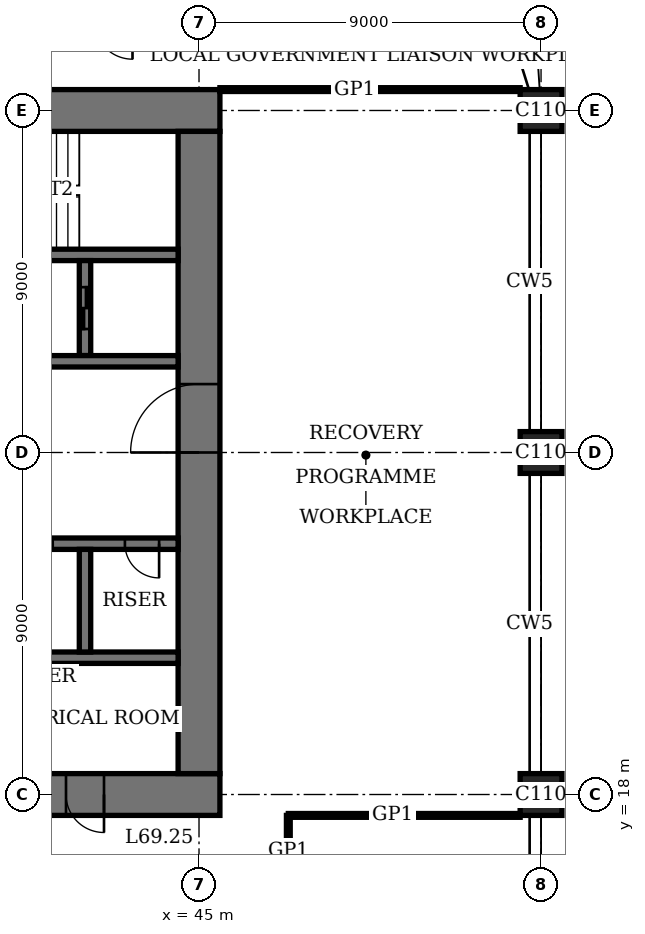
"""IFC4 building model, lengths in metres.
Left out: names, types, materials, properties, quantities, classifications, styles, units other than length and angle.
Written with IfcOpenShell. Run it as: python <this file> out.ifc"""

import sys

from ifc_helpers import new_model, si_unit, direction, frame, frame_2d, origin, origin_2d, place, context, subcontext, project, spatial, rectangle, extrude, element, fill, save


model = new_model("IFC4")
c1 = context("Model", 3, precision=1e-05, world=origin(), true_north=direction((0.0, 1.0)))
c2 = subcontext(c1, "Body", "Model", "MODEL_VIEW")
j1 = project(units=[si_unit("LENGTHUNIT", "METRE"), si_unit("PLANEANGLEUNIT", "RADIAN")], contexts=[c1])
p1 = place(None, origin())
s1 = spatial("IfcSite", under=j1, at=p1, CompositionType="ELEMENT")
p2 = place(p1, origin())
s2 = spatial("IfcBuilding", under=s1, at=p2, CompositionType="ELEMENT")
p3 = place(p2, frame((0.0, 0.0, 283.4)))
s3 = spatial("IfcBuildingStorey", under=s2, at=p3, CompositionType="ELEMENT", Elevation=283.4)
for number, where, z_axis, x_axis in (
    (1, (54.0, 18.0, 0.0), (0.0, 0.0, 1.0), (1.0, 0.0, 0.0)),
    (2, (54.0, 27.0, 0.0), (0.0, 0.0, 1.0), (1.0, 0.0, 0.0)),
    (3, (54.0, 36.0, 0.0), (0.0, 0.0, 1.0), (1.0, 0.0, 0.0)),
):
    element("IfcColumn", number, at=place(p3, frame(where, z_axis=z_axis, x_axis=x_axis)), inside=s3, PredefinedType="COLUMN", context=c2, shape_type="SweptSolid", body=[
        extrude(rectangle(XDim=1.1, YDim=1.1, at=origin_2d()), origin(), (0.0, 0.0, 1.0), 4.0),
    ])
p4 = place(p3, frame((17.45, 18.0, 0.0), z_axis=(0.0, 0.0, 1.0), x_axis=(1.0, 0.0, 0.0)))
e4 = element("IfcWall", 4, at=p4, inside=s3, PredefinedType="SHEAR", context=c2, shape_type="SweptSolid", body=[
    extrude(rectangle(XDim=28.1, YDim=1.1, at=frame_2d((14.05, 0.0))), origin(), (0.0, 0.0, 1.0), 4.0),
])
p5 = place(p4, frame((11.55, 0.0, 0.0)))
e5 = element("IfcOpeningElement", 5, at=p5, cuts=e4, PredefinedType="OPENING", context=c2, shape_type="SweptSolid", body=[
    extrude(rectangle(XDim=1.0, YDim=2.4, at=frame_2d((0.5, 1.2))), frame((0.0, 0.56, 0.0), z_axis=(0.0, -1.0, 0.0), x_axis=(1.0, 0.0, 0.0)), (0.0, 0.0, 1.0), 1.12),
])
p6 = place(p4, frame((16.55, 0.0, 0.0)))
e6 = element("IfcOpeningElement", 6, at=p6, cuts=e4, PredefinedType="OPENING", context=c2, shape_type="SweptSolid", body=[
    extrude(rectangle(XDim=1.0, YDim=2.4, at=frame_2d((0.5, 1.2))), frame((0.0, 0.56, 0.0), z_axis=(0.0, -1.0, 0.0), x_axis=(1.0, 0.0, 0.0)), (0.0, 0.0, 1.0), 1.12),
])
p7 = place(p4, frame((20.0, 0.0, 0.0)))
e7 = element("IfcOpeningElement", 7, at=p7, cuts=e4, PredefinedType="OPENING", context=c2, shape_type="SweptSolid", body=[
    extrude(rectangle(XDim=1.1, YDim=2.4, at=frame_2d((0.55, 1.2))), frame((0.0, 0.56, 0.0), z_axis=(0.0, -1.0, 0.0), x_axis=(1.0, 0.0, 0.0)), (0.0, 0.0, 1.0), 1.12),
])
p8 = place(p4, frame((24.05, 0.0, 0.0)))
e8 = element("IfcOpeningElement", 8, at=p8, cuts=e4, PredefinedType="OPENING", context=c2, shape_type="SweptSolid", body=[
    extrude(rectangle(XDim=1.0, YDim=2.4, at=frame_2d((0.5, 1.2))), frame((0.0, 0.56, 0.0), z_axis=(0.0, -1.0, 0.0), x_axis=(1.0, 0.0, 0.0)), (0.0, 0.0, 1.0), 1.12),
])
p9 = place(p3, frame((45.55, 36.0, 0.0), z_axis=(0.0, 0.0, 1.0), x_axis=(-1.0, 0.0, 0.0)))
e9 = element("IfcWall", 9, at=p9, inside=s3, PredefinedType="SHEAR", context=c2, shape_type="SweptSolid", body=[
    extrude(rectangle(XDim=28.1, YDim=1.1, at=frame_2d((14.05, 0.0))), origin(), (0.0, 0.0, 1.0), 4.0),
])
p10 = place(p9, frame((11.55, 0.0, 0.0)))
e10 = element("IfcOpeningElement", 10, at=p10, cuts=e9, PredefinedType="OPENING", context=c2, shape_type="SweptSolid", body=[
    extrude(rectangle(XDim=1.0, YDim=2.4, at=frame_2d((0.5, 1.2))), frame((0.0, 0.56, 0.0), z_axis=(0.0, -1.0, 0.0), x_axis=(1.0, 0.0, 0.0)), (0.0, 0.0, 1.0), 1.12),
])
p11 = place(p9, frame((16.55, 0.0, 0.0)))
e11 = element("IfcOpeningElement", 11, at=p11, cuts=e9, PredefinedType="OPENING", context=c2, shape_type="SweptSolid", body=[
    extrude(rectangle(XDim=1.0, YDim=2.4, at=frame_2d((0.5, 1.2))), frame((0.0, 0.56, 0.0), z_axis=(0.0, -1.0, 0.0), x_axis=(1.0, 0.0, 0.0)), (0.0, 0.0, 1.0), 1.12),
])
p12 = place(p9, frame((20.0, 0.0, 0.0)))
e12 = element("IfcOpeningElement", 12, at=p12, cuts=e9, PredefinedType="OPENING", context=c2, shape_type="SweptSolid", body=[
    extrude(rectangle(XDim=1.1, YDim=2.4, at=frame_2d((0.55, 1.2))), frame((0.0, 0.56, 0.0), z_axis=(0.0, -1.0, 0.0), x_axis=(1.0, 0.0, 0.0)), (0.0, 0.0, 1.0), 1.12),
])
p13 = place(p9, frame((24.05, 0.0, 0.0)))
e13 = element("IfcOpeningElement", 13, at=p13, cuts=e9, PredefinedType="OPENING", context=c2, shape_type="SweptSolid", body=[
    extrude(rectangle(XDim=1.0, YDim=2.4, at=frame_2d((0.5, 1.2))), frame((0.0, 0.56, 0.0), z_axis=(0.0, -1.0, 0.0), x_axis=(1.0, 0.0, 0.0)), (0.0, 0.0, 1.0), 1.12),
])
p14 = place(p3, frame((45.0, 18.55, 0.0), z_axis=(0.0, 0.0, 1.0), x_axis=(0.0, 1.0, 0.0)))
e14 = element("IfcWall", 14, at=p14, inside=s3, PredefinedType="SHEAR", context=c2, shape_type="SweptSolid", body=[
    extrude(rectangle(XDim=16.9, YDim=1.1, at=frame_2d((8.45, 0.0))), origin(), (0.0, 0.0, 1.0), 4.0),
])
p15 = place(p14, frame((8.45, 0.0, 0.0)))
e15 = element("IfcOpeningElement", 15, at=p15, cuts=e14, PredefinedType="OPENING", context=c2, shape_type="SweptSolid", body=[
    extrude(rectangle(XDim=1.8, YDim=2.4, at=frame_2d((0.9, 1.2))), frame((0.0, 0.56, 0.0), z_axis=(0.0, -1.0, 0.0), x_axis=(1.0, 0.0, 0.0)), (0.0, 0.0, 1.0), 1.12),
])
p16 = place(p3, frame((36.15, 32.2, 0.0), z_axis=(0.0, 0.0, 1.0), x_axis=(1.0, 0.0, 0.0)))
e16 = element("IfcWall", 16, at=p16, inside=s3, PredefinedType="SHEAR", context=c2, shape_type="SweptSolid", body=[
    extrude(rectangle(XDim=8.3, YDim=0.3, at=frame_2d((4.15, 0.0))), origin(), (0.0, 0.0, 1.0), 4.0),
])
p17 = place(p16, frame((0.45, 0.0, 0.0)))
e17 = element("IfcOpeningElement", 17, at=p17, cuts=e16, PredefinedType="OPENING", context=c2, shape_type="SweptSolid", body=[
    extrude(rectangle(XDim=1.0, YDim=2.4, at=frame_2d((0.5, 1.2))), frame((0.0, 0.16, 0.0), z_axis=(0.0, -1.0, 0.0), x_axis=(1.0, 0.0, 0.0)), (0.0, 0.0, 1.0), 0.32),
])
p18 = place(p3, frame((42.0, 29.55, 0.0), z_axis=(0.0, 0.0, 1.0), x_axis=(0.0, 1.0, 0.0)))
e18 = element("IfcWall", 18, at=p18, inside=s3, PredefinedType="SHEAR", context=c2, shape_type="SweptSolid", body=[
    extrude(rectangle(XDim=2.5, YDim=0.3, at=frame_2d((1.25, 0.0))), origin(), (0.0, 0.0, 1.0), 4.0),
])
p19 = place(p18, frame((0.7, 0.0, 0.0)))
e19 = element("IfcOpeningElement", 19, at=p19, cuts=e18, PredefinedType="OPENING", context=c2, shape_type="SweptSolid", body=[
    extrude(rectangle(XDim=1.1, YDim=2.4, at=frame_2d((0.55, 1.2))), frame((0.0, 0.16, 0.0), z_axis=(0.0, -1.0, 0.0), x_axis=(1.0, 0.0, 0.0)), (0.0, 0.0, 1.0), 0.32),
])
p20 = place(p3, frame((18.55, 24.6, 0.0), z_axis=(0.0, 0.0, 1.0), x_axis=(1.0, 0.0, 0.0)))
e20 = element("IfcWall", 20, at=p20, inside=s3, PredefinedType="SHEAR", context=c2, shape_type="SweptSolid", body=[
    extrude(rectangle(XDim=25.9, YDim=0.3, at=frame_2d((12.95, 0.0))), origin(), (0.0, 0.0, 1.0), 4.0),
])
p21 = place(p20, frame((4.95, 0.0, 0.0)))
e21 = element("IfcOpeningElement", 21, at=p21, cuts=e20, PredefinedType="OPENING", context=c2, shape_type="SweptSolid", body=[
    extrude(rectangle(XDim=1.0, YDim=2.4, at=frame_2d((0.5, 1.2))), frame((0.0, 0.16, 0.0), z_axis=(0.0, -1.0, 0.0), x_axis=(1.0, 0.0, 0.0)), (0.0, 0.0, 1.0), 0.32),
])
p22 = place(p20, frame((24.5, 0.0, 0.0)))
e22 = element("IfcOpeningElement", 22, at=p22, cuts=e20, PredefinedType="OPENING", context=c2, shape_type="SweptSolid", body=[
    extrude(rectangle(XDim=0.9, YDim=2.1, at=frame_2d((0.45, 1.05))), frame((0.0, 0.16, 0.0), z_axis=(0.0, -1.0, 0.0), x_axis=(1.0, 0.0, 0.0)), (0.0, 0.0, 1.0), 0.32),
])
p23 = place(p20, frame((9.4, 0.0, 0.0)))
e23 = element("IfcOpeningElement", 23, at=p23, cuts=e20, PredefinedType="OPENING", context=c2, shape_type="SweptSolid", body=[
    extrude(rectangle(XDim=1.1, YDim=2.4, at=frame_2d((0.55, 1.2))), frame((0.0, 0.16, 0.0), z_axis=(0.0, -1.0, 0.0), x_axis=(1.0, 0.0, 0.0)), (0.0, 0.0, 1.0), 0.32),
])
p24 = place(p20, frame((12.4, 0.0, 0.0)))
e24 = element("IfcOpeningElement", 24, at=p24, cuts=e20, PredefinedType="OPENING", context=c2, shape_type="SweptSolid", body=[
    extrude(rectangle(XDim=1.1, YDim=2.4, at=frame_2d((0.55, 1.2))), frame((0.0, 0.16, 0.0), z_axis=(0.0, -1.0, 0.0), x_axis=(1.0, 0.0, 0.0)), (0.0, 0.0, 1.0), 0.32),
])
p25 = place(p20, frame((15.4, 0.0, 0.0)))
e25 = element("IfcOpeningElement", 25, at=p25, cuts=e20, PredefinedType="OPENING", context=c2, shape_type="SweptSolid", body=[
    extrude(rectangle(XDim=1.1, YDim=2.4, at=frame_2d((0.55, 1.2))), frame((0.0, 0.16, 0.0), z_axis=(0.0, -1.0, 0.0), x_axis=(1.0, 0.0, 0.0)), (0.0, 0.0, 1.0), 0.32),
])
p26 = place(p20, frame((18.4, 0.0, 0.0)))
e26 = element("IfcOpeningElement", 26, at=p26, cuts=e20, PredefinedType="OPENING", context=c2, shape_type="SweptSolid", body=[
    extrude(rectangle(XDim=1.1, YDim=2.4, at=frame_2d((0.55, 1.2))), frame((0.0, 0.16, 0.0), z_axis=(0.0, -1.0, 0.0), x_axis=(1.0, 0.0, 0.0)), (0.0, 0.0, 1.0), 0.32),
])
p27 = place(p20, frame((21.3, 0.0, 0.0)))
e27 = element("IfcOpeningElement", 27, at=p27, cuts=e20, PredefinedType="OPENING", context=c2, shape_type="SweptSolid", body=[
    extrude(rectangle(XDim=1.3, YDim=2.4, at=frame_2d((0.65, 1.2))), frame((0.0, 0.16, 0.0), z_axis=(0.0, -1.0, 0.0), x_axis=(1.0, 0.0, 0.0)), (0.0, 0.0, 1.0), 0.32),
])
p28 = place(p3, frame((18.55, 29.4, 0.0), z_axis=(0.0, 0.0, 1.0), x_axis=(1.0, 0.0, 0.0)))
e28 = element("IfcWall", 28, at=p28, inside=s3, PredefinedType="SHEAR", context=c2, shape_type="SweptSolid", body=[
    extrude(rectangle(XDim=25.9, YDim=0.3, at=frame_2d((12.95, 0.0))), origin(), (0.0, 0.0, 1.0), 4.0),
])
p29 = place(p28, frame((19.95, 0.0, 0.0)))
e29 = element("IfcOpeningElement", 29, at=p29, cuts=e28, PredefinedType="OPENING", context=c2, shape_type="SweptSolid", body=[
    extrude(rectangle(XDim=1.0, YDim=2.4, at=frame_2d((0.5, 1.2))), frame((0.0, 0.16, 0.0), z_axis=(0.0, -1.0, 0.0), x_axis=(1.0, 0.0, 0.0)), (0.0, 0.0, 1.0), 0.32),
])
p30 = place(p28, frame((0.5, 0.0, 0.0)))
e30 = element("IfcOpeningElement", 30, at=p30, cuts=e28, PredefinedType="OPENING", context=c2, shape_type="SweptSolid", body=[
    extrude(rectangle(XDim=0.9, YDim=2.1, at=frame_2d((0.45, 1.05))), frame((0.0, 0.16, 0.0), z_axis=(0.0, -1.0, 0.0), x_axis=(1.0, 0.0, 0.0)), (0.0, 0.0, 1.0), 0.32),
])
p31 = place(p28, frame((15.45, 0.0, 0.0)))
e31 = element("IfcOpeningElement", 31, at=p31, cuts=e28, PredefinedType="OPENING", context=c2, shape_type="SweptSolid", body=[
    extrude(rectangle(XDim=1.0, YDim=2.4, at=frame_2d((0.5, 1.2))), frame((0.0, 0.16, 0.0), z_axis=(0.0, -1.0, 0.0), x_axis=(1.0, 0.0, 0.0)), (0.0, 0.0, 1.0), 0.32),
])
p32 = place(p28, frame((12.45, 0.0, 0.0)))
e32 = element("IfcOpeningElement", 32, at=p32, cuts=e28, PredefinedType="OPENING", context=c2, shape_type="SweptSolid", body=[
    extrude(rectangle(XDim=1.0, YDim=2.4, at=frame_2d((0.5, 1.2))), frame((0.0, 0.16, 0.0), z_axis=(0.0, -1.0, 0.0), x_axis=(1.0, 0.0, 0.0)), (0.0, 0.0, 1.0), 0.32),
])
p33 = place(p28, frame((9.45, 0.0, 0.0)))
e33 = element("IfcOpeningElement", 33, at=p33, cuts=e28, PredefinedType="OPENING", context=c2, shape_type="SweptSolid", body=[
    extrude(rectangle(XDim=1.0, YDim=2.4, at=frame_2d((0.5, 1.2))), frame((0.0, 0.16, 0.0), z_axis=(0.0, -1.0, 0.0), x_axis=(1.0, 0.0, 0.0)), (0.0, 0.0, 1.0), 0.32),
])
p34 = place(p28, frame((6.45, 0.0, 0.0)))
e34 = element("IfcOpeningElement", 34, at=p34, cuts=e28, PredefinedType="OPENING", context=c2, shape_type="SweptSolid", body=[
    extrude(rectangle(XDim=1.0, YDim=2.4, at=frame_2d((0.5, 1.2))), frame((0.0, 0.16, 0.0), z_axis=(0.0, -1.0, 0.0), x_axis=(1.0, 0.0, 0.0)), (0.0, 0.0, 1.0), 0.32),
])
p35 = place(p28, frame((3.3, 0.0, 0.0)))
e35 = element("IfcOpeningElement", 35, at=p35, cuts=e28, PredefinedType="OPENING", context=c2, shape_type="SweptSolid", body=[
    extrude(rectangle(XDim=1.3, YDim=2.4, at=frame_2d((0.65, 1.2))), frame((0.0, 0.16, 0.0), z_axis=(0.0, -1.0, 0.0), x_axis=(1.0, 0.0, 0.0)), (0.0, 0.0, 1.0), 0.32),
])
p36 = place(p3, frame((27.15, 21.6, 0.0), z_axis=(0.0, 0.0, 1.0), x_axis=(1.0, 0.0, 0.0)))
e36 = element("IfcWall", 36, at=p36, inside=s3, PredefinedType="SHEAR", context=c2, shape_type="SweptSolid", body=[
    extrude(rectangle(XDim=17.3, YDim=0.3, at=frame_2d((8.65, 0.0))), origin(), (0.0, 0.0, 1.0), 4.0),
])
p37 = place(p3, frame((42.0, 21.75, 0.0), z_axis=(0.0, 0.0, 1.0), x_axis=(0.0, 1.0, 0.0)))
e37 = element("IfcWall", 37, at=p37, inside=s3, PredefinedType="SHEAR", context=c2, shape_type="SweptSolid", body=[
    extrude(rectangle(XDim=2.7, YDim=0.3, at=frame_2d((1.35, 0.0))), origin(), (0.0, 0.0, 1.0), 4.0),
])
p38 = place(p3, frame((47.35, 17.45, 0.0), z_axis=(0.0, 0.0, 1.0), x_axis=(1.0, 0.0, 0.0)))
e38 = element("IfcWall", 38, at=p38, inside=s3, PredefinedType="PARTITIONING", context=c2, shape_type="SweptSolid", body=[
    extrude(rectangle(XDim=6.1, YDim=0.1, at=frame_2d((3.05, 0.0))), origin(), (0.0, 0.0, 1.0), 3.75),
])
p39 = place(p3, frame((45.55, 36.55, 0.0), z_axis=(0.0, 0.0, 1.0), x_axis=(1.0, 0.0, 0.0)))
e39 = element("IfcWall", 39, at=p39, inside=s3, PredefinedType="PARTITIONING", context=c2, shape_type="SweptSolid", body=[
    extrude(rectangle(XDim=7.9, YDim=0.1, at=frame_2d((3.95, 0.0))), origin(), (0.0, 0.0, 1.0), 3.75),
])
p40 = place(p3, frame((47.35, 15.6, 0.0), z_axis=(0.0, 0.0, 1.0), x_axis=(0.0, 1.0, 0.0)))
e40 = element("IfcWall", 40, at=p40, inside=s3, PredefinedType="PARTITIONING", context=c2, shape_type="SweptSolid", body=[
    extrude(rectangle(XDim=1.85, YDim=0.1, at=frame_2d((0.925, 0.0))), origin(), (0.0, 0.0, 1.0), 3.75),
])
p41 = place(p15, origin())
e41 = element("IfcDoor", 41, at=p41, inside=s3, OperationType="DOUBLE_DOOR_DOUBLE_SWING", PredefinedType="DOOR", context=c2, shape_type="SweptSolid", body=[
    extrude(rectangle(XDim=1.8, YDim=2.4, at=frame_2d((0.9, 1.2))), frame((0.0, 0.03, 0.0), z_axis=(0.0, -1.0, 0.0), x_axis=(1.0, 0.0, 0.0)), (0.0, 0.0, 1.0), 0.06),
    extrude(rectangle(XDim=0.04, YDim=2.4, at=frame_2d((0.02, 1.2))), frame((0.0, 0.55, 0.0), z_axis=(0.0, -1.0, 0.0), x_axis=(1.0, 0.0, 0.0)), (0.0, 0.0, 1.0), 1.1),
    extrude(rectangle(XDim=0.04, YDim=2.4, at=frame_2d((1.78, 1.2))), frame((0.0, 0.55, 0.0), z_axis=(0.0, -1.0, 0.0), x_axis=(1.0, 0.0, 0.0)), (0.0, 0.0, 1.0), 1.1),
    extrude(rectangle(XDim=1.8, YDim=0.04, at=frame_2d((0.9, 2.38))), frame((0.0, 0.55, 0.0), z_axis=(0.0, -1.0, 0.0), x_axis=(1.0, 0.0, 0.0)), (0.0, 0.0, 1.0), 1.1),
])
fill(e15, e41)
p42 = place(p8, origin())
e42 = element("IfcDoor", 42, at=p42, inside=s3, OperationType="SINGLE_SWING_RIGHT", PredefinedType="DOOR", context=c2, shape_type="SweptSolid", body=[
    extrude(rectangle(XDim=1.0, YDim=2.4, at=frame_2d((0.5, 1.2))), frame((0.0, 0.025, 0.0), z_axis=(0.0, -1.0, 0.0), x_axis=(1.0, 0.0, 0.0)), (0.0, 0.0, 1.0), 0.05),
    extrude(rectangle(XDim=0.04, YDim=2.4, at=frame_2d((0.02, 1.2))), frame((0.0, 0.4, 0.0), z_axis=(0.0, -1.0, 0.0), x_axis=(1.0, 0.0, 0.0)), (0.0, 0.0, 1.0), 0.8),
    extrude(rectangle(XDim=0.04, YDim=2.4, at=frame_2d((0.98, 1.2))), frame((0.0, 0.4, 0.0), z_axis=(0.0, -1.0, 0.0), x_axis=(1.0, 0.0, 0.0)), (0.0, 0.0, 1.0), 0.8),
    extrude(rectangle(XDim=1.0, YDim=0.04, at=frame_2d((0.5, 2.38))), frame((0.0, 0.4, 0.0), z_axis=(0.0, -1.0, 0.0), x_axis=(1.0, 0.0, 0.0)), (0.0, 0.0, 1.0), 0.8),
])
fill(e8, e42)
p43 = place(p22, origin())
e43 = element("IfcDoor", 43, at=p43, inside=s3, OperationType="SINGLE_SWING_RIGHT", PredefinedType="DOOR", context=c2, shape_type="SweptSolid", body=[
    extrude(rectangle(XDim=0.9, YDim=2.1, at=frame_2d((0.45, 1.05))), frame((0.0, 0.03, 0.0), z_axis=(0.0, -1.0, 0.0), x_axis=(1.0, 0.0, 0.0)), (0.0, 0.0, 1.0), 0.06),
])
fill(e22, e43)
p44 = place(p27, origin())
e44 = element("IfcDoor", 44, at=p44, inside=s3, OperationType="DOUBLE_DOOR_SLIDING", PredefinedType="DOOR", context=c2, shape_type="SweptSolid", body=[
    extrude(rectangle(XDim=1.3, YDim=2.4, at=frame_2d((0.65, 1.2))), frame((0.0, 0.02, 0.0), z_axis=(0.0, -1.0, 0.0), x_axis=(1.0, 0.0, 0.0)), (0.0, 0.0, 1.0), 0.04),
])
fill(e27, e44)
p45 = place(p19, origin())
e45 = element("IfcDoor", 45, at=p45, inside=s3, OperationType="DOUBLE_DOOR_SLIDING", PredefinedType="DOOR", context=c2, shape_type="SweptSolid", body=[
    extrude(rectangle(XDim=1.1, YDim=2.4, at=frame_2d((0.55, 1.2))), frame((0.0, 0.03, 0.0), z_axis=(0.0, -1.0, 0.0), x_axis=(1.0, 0.0, 0.0)), (0.0, 0.0, 1.0), 0.06),
])
fill(e19, e45)
save(model, sys.argv[1])
